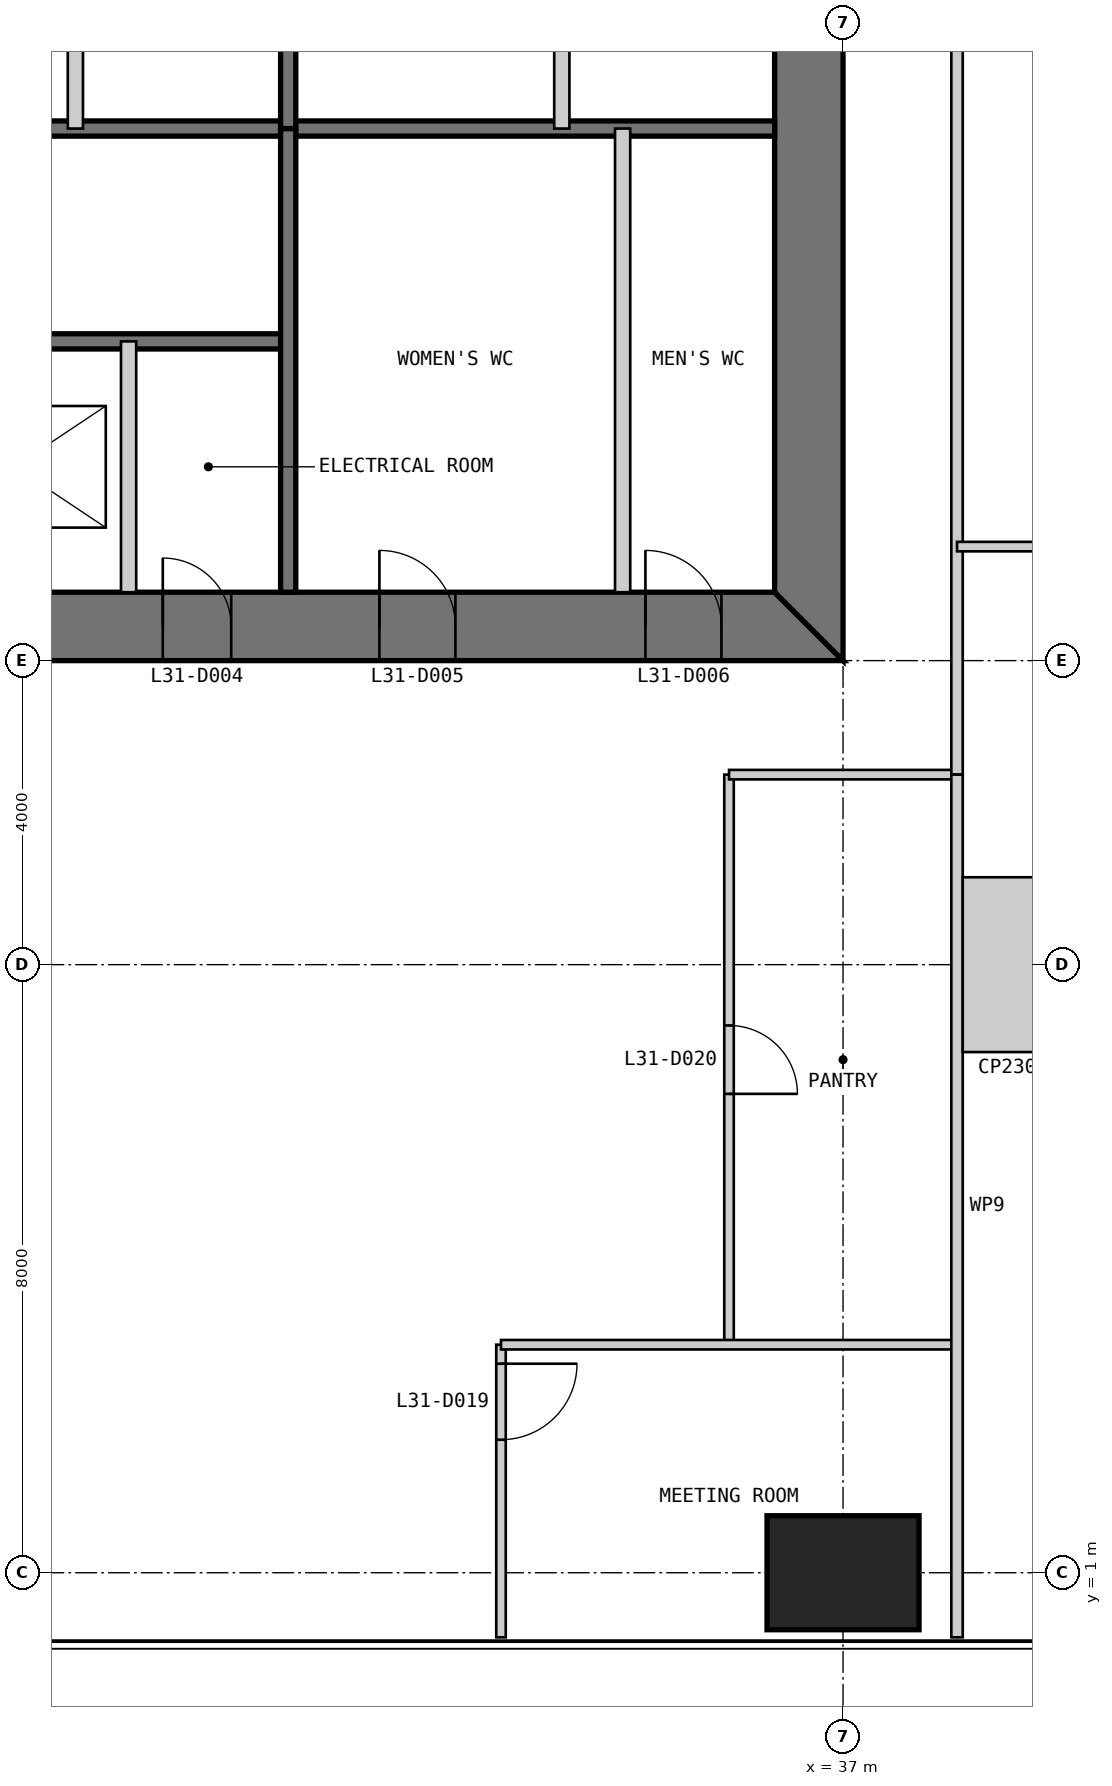
"""IFC4 building model, lengths in metres.
Left out: names, types, materials, properties, quantities, classifications, styles, units other than length and angle.
Written with IfcOpenShell. Run it as: python <this file> out.ifc"""

import sys

from ifc_helpers import new_model, si_unit, direction, frame, frame_2d, origin, origin_2d, place, context, subcontext, project, spatial, polyline, rectangle, outline, extrude, element, fill, save


model = new_model("IFC4")
c1 = context("Model", 3, precision=1e-05, world=origin(), true_north=direction((0.0, 1.0)))
c2 = subcontext(c1, "Body", "Model", "MODEL_VIEW")
j1 = project(units=[si_unit("LENGTHUNIT", "METRE"), si_unit("PLANEANGLEUNIT", "RADIAN")], contexts=[c1])
p1 = place(None, origin())
s1 = spatial("IfcSite", under=j1, at=p1, CompositionType="ELEMENT")
p2 = place(p1, origin())
s2 = spatial("IfcBuilding", under=s1, at=p2, CompositionType="ELEMENT")
p3 = place(p2, frame((0.0, 0.0, 134.4)))
s3 = spatial("IfcBuildingStorey", under=s2, at=p3, CompositionType="ELEMENT", Elevation=134.4)
p4 = place(p3, frame((37.0, 1.0, 0.0), z_axis=(0.0, 0.0, 1.0), x_axis=(1.0, 0.0, 0.0)))
e1 = element("IfcColumn", 1, at=p4, inside=s3, PredefinedType="COLUMN", context=c2, shape_type="SweptSolid", body=[
    extrude(rectangle(XDim=2.0, YDim=1.5, at=origin_2d()), origin(), (0.0, 0.0, 1.0), 4.0),
])
p5 = place(p3, frame((13.0, 13.45, 0.0), z_axis=(0.0, 0.0, 1.0), x_axis=(1.0, 0.0, 0.0)))
e2 = element("IfcWall", 2, at=p5, inside=s3, PredefinedType="SHEAR", context=c2, shape_type="SweptSolid", body=[
    extrude(outline(polyline([(0.0, -0.45), (24.0, -0.45), (23.1, 0.45), (0.9, 0.45), (0.0, -0.45)])), origin(), (0.0, 0.0, 1.0), 4.0),
])
p6 = place(p5, frame((4.9, 0.0, 0.0)))
e3 = element("IfcOpeningElement", 3, at=p6, cuts=e2, PredefinedType="OPENING", context=c2, shape_type="SweptSolid", body=[
    extrude(rectangle(XDim=1.0, YDim=2.2, at=frame_2d((0.5, 1.1))), frame((0.0, 0.46, 0.0), z_axis=(0.0, -1.0, 0.0), x_axis=(1.0, 0.0, 0.0)), (0.0, 0.0, 1.0), 0.92),
])
p7 = place(p5, frame((8.9, 0.0, 0.0)))
e4 = element("IfcOpeningElement", 4, at=p7, cuts=e2, PredefinedType="OPENING", context=c2, shape_type="SweptSolid", body=[
    extrude(rectangle(XDim=1.1, YDim=2.2, at=frame_2d((0.55, 1.1))), frame((0.0, 0.46, 0.0), z_axis=(0.0, -1.0, 0.0), x_axis=(1.0, 0.0, 0.0)), (0.0, 0.0, 1.0), 0.92),
])
p8 = place(p5, frame((15.05, 0.0, 0.0)))
e5 = element("IfcOpeningElement", 5, at=p8, cuts=e2, PredefinedType="OPENING", context=c2, shape_type="SweptSolid", body=[
    extrude(rectangle(XDim=0.9, YDim=2.2, at=frame_2d((0.45, 1.1))), frame((0.0, 0.46, 0.0), z_axis=(0.0, -1.0, 0.0), x_axis=(1.0, 0.0, 0.0)), (0.0, 0.0, 1.0), 0.92),
])
p9 = place(p5, frame((17.9, 0.0, 0.0)))
e6 = element("IfcOpeningElement", 6, at=p9, cuts=e2, PredefinedType="OPENING", context=c2, shape_type="SweptSolid", body=[
    extrude(rectangle(XDim=1.0, YDim=2.2, at=frame_2d((0.5, 1.1))), frame((0.0, 0.46, 0.0), z_axis=(0.0, -1.0, 0.0), x_axis=(1.0, 0.0, 0.0)), (0.0, 0.0, 1.0), 0.92),
])
p10 = place(p5, frame((21.4, 0.0, 0.0)))
e7 = element("IfcOpeningElement", 7, at=p10, cuts=e2, PredefinedType="OPENING", context=c2, shape_type="SweptSolid", body=[
    extrude(rectangle(XDim=1.0, YDim=2.2, at=frame_2d((0.5, 1.1))), frame((0.0, 0.46, 0.0), z_axis=(0.0, -1.0, 0.0), x_axis=(1.0, 0.0, 0.0)), (0.0, 0.0, 1.0), 0.92),
])
p11 = place(p3, frame((36.55, 13.9, 0.0), z_axis=(0.0, 0.0, 1.0), x_axis=(0.0, 1.0, 0.0)))
e8 = element("IfcWall", 8, at=p11, inside=s3, PredefinedType="SHEAR", context=c2, shape_type="SweptSolid", body=[
    extrude(outline(polyline([(-0.9, -0.45), (23.1, -0.45), (22.2, 0.45), (0.0, 0.45), (-0.9, -0.45)])), origin(), (0.0, 0.0, 1.0), 4.0),
])
p12 = place(p11, frame((20.2, 0.0, 0.0)))
e9 = element("IfcOpeningElement", 9, at=p12, cuts=e8, PredefinedType="OPENING", context=c2, shape_type="SweptSolid", body=[
    extrude(rectangle(XDim=1.0, YDim=2.2, at=frame_2d((0.5, 1.1))), frame((0.0, 0.46, 0.0), z_axis=(0.0, -1.0, 0.0), x_axis=(1.0, 0.0, 0.0)), (0.0, 0.0, 1.0), 0.92),
])
p13 = place(p11, frame((17.25, 0.0, 0.0)))
e10 = element("IfcOpeningElement", 10, at=p13, cuts=e8, PredefinedType="OPENING", context=c2, shape_type="SweptSolid", body=[
    extrude(rectangle(XDim=0.9, YDim=2.2, at=frame_2d((0.45, 1.1))), frame((0.0, 0.46, 0.0), z_axis=(0.0, -1.0, 0.0), x_axis=(1.0, 0.0, 0.0)), (0.0, 0.0, 1.0), 0.92),
])
p14 = place(p3, frame((20.3, 17.2, 0.0), z_axis=(0.0, 0.0, 1.0), x_axis=(1.0, 0.0, 0.0)))
e11 = element("IfcWall", 11, at=p14, inside=s3, PredefinedType="SOLIDWALL", context=c2, shape_type="SweptSolid", body=[
    extrude(rectangle(XDim=9.4, YDim=0.2, at=frame_2d((4.7, 0.0))), origin(), (0.0, 0.0, 1.0), 3.8),
])
p15 = place(p14, frame((0.25, 0.0, 0.0)))
e12 = element("IfcOpeningElement", 12, at=p15, cuts=e11, PredefinedType="OPENING", context=c2, shape_type="SweptSolid", body=[
    extrude(rectangle(XDim=1.0, YDim=2.2, at=frame_2d((0.5, 1.1))), frame((0.0, 0.11, 0.0), z_axis=(0.0, -1.0, 0.0), x_axis=(1.0, 0.0, 0.0)), (0.0, 0.0, 1.0), 0.22),
])
p16 = place(p3, frame((20.3, 20.0, 0.0), z_axis=(0.0, 0.0, 1.0), x_axis=(1.0, 0.0, 0.0)))
e13 = element("IfcWall", 13, at=p16, inside=s3, PredefinedType="SOLIDWALL", context=c2, shape_type="SweptSolid", body=[
    extrude(rectangle(XDim=15.8, YDim=0.2, at=frame_2d((7.9, 0.0))), origin(), (0.0, 0.0, 1.0), 3.8),
])
p17 = place(p3, frame((27.6, 13.9, 0.0), z_axis=(0.0, 0.0, 1.0), x_axis=(0.0, 1.0, 0.0)))
e14 = element("IfcWall", 14, at=p17, inside=s3, PredefinedType="PARTITIONING", context=c2, shape_type="SweptSolid", body=[
    extrude(rectangle(XDim=3.3, YDim=0.2, at=frame_2d((1.65, 0.0))), origin(), (0.0, 0.0, 1.0), 3.8),
])
p18 = place(p3, frame((29.7, 13.9, 0.0), z_axis=(0.0, 0.0, 1.0), x_axis=(0.0, 1.0, 0.0)))
e15 = element("IfcWall", 15, at=p18, inside=s3, PredefinedType="SOLIDWALL", context=c2, shape_type="SweptSolid", body=[
    extrude(rectangle(XDim=6.1, YDim=0.2, at=frame_2d((3.05, 0.0))), origin(), (0.0, 0.0, 1.0), 3.8),
])
p19 = place(p3, frame((34.1, 13.9, 0.0), z_axis=(0.0, 0.0, 1.0), x_axis=(0.0, 1.0, 0.0)))
e16 = element("IfcWall", 16, at=p19, inside=s3, PredefinedType="PARTITIONING", context=c2, shape_type="SweptSolid", body=[
    extrude(rectangle(XDim=6.1, YDim=0.2, at=frame_2d((3.05, 0.0))), origin(), (0.0, 0.0, 1.0), 3.8),
])
p20 = place(p3, frame((33.3, 36.1, 0.0), z_axis=(0.0, 0.0, 1.0), x_axis=(0.0, -1.0, 0.0)))
e17 = element("IfcWall", 17, at=p20, inside=s3, PredefinedType="PARTITIONING", context=c2, shape_type="SweptSolid", body=[
    extrude(rectangle(XDim=16.1, YDim=0.2, at=frame_2d((8.05, 0.0))), origin(), (0.0, 0.0, 1.0), 3.8),
])
p21 = place(p3, frame((29.7, 36.1, 0.0), z_axis=(0.0, 0.0, 1.0), x_axis=(0.0, -1.0, 0.0)))
e18 = element("IfcWall", 18, at=p21, inside=s3, PredefinedType="SOLIDWALL", context=c2, shape_type="SweptSolid", body=[
    extrude(rectangle(XDim=16.1, YDim=0.2, at=frame_2d((8.05, 0.0))), origin(), (0.0, 0.0, 1.0), 3.8),
])
p22 = place(p3, frame((26.9, 30.0, 0.0), z_axis=(0.0, 0.0, 1.0), x_axis=(0.0, -1.0, 0.0)))
e19 = element("IfcWall", 19, at=p22, inside=s3, PredefinedType="PARTITIONING", context=c2, shape_type="SweptSolid", body=[
    extrude(rectangle(XDim=10.0, YDim=0.2, at=frame_2d((5.0, 0.0))), origin(), (0.0, 0.0, 1.0), 3.8),
])
p23 = place(p3, frame((32.5, 0.15, 0.0), z_axis=(0.0, 0.0, 1.0), x_axis=(0.0, 1.0, 0.0)))
e20 = element("IfcWall", 20, at=p23, inside=s3, PredefinedType="PARTITIONING", context=c2, shape_type="SweptSolid", body=[
    extrude(rectangle(XDim=3.85, YDim=0.125, at=frame_2d((1.925, 0.0))), origin(), (0.0, 0.0, 1.0), 3.85),
])
p24 = place(p23, frame((2.6, 0.0, 0.0)))
e21 = element("IfcOpeningElement", 21, at=p24, cuts=e20, PredefinedType="OPENING", context=c2, shape_type="SweptSolid", body=[
    extrude(rectangle(XDim=1.0, YDim=2.2, at=frame_2d((0.5, 1.1))), frame((0.0, 0.073, 0.0), z_axis=(0.0, -1.0, 0.0), x_axis=(1.0, 0.0, 0.0)), (0.0, 0.0, 1.0), 0.145),
])
p25 = place(p3, frame((35.5, 4.0, 0.0), z_axis=(0.0, 0.0, 1.0), x_axis=(0.0, 1.0, 0.0)))
e22 = element("IfcWall", 22, at=p25, inside=s3, PredefinedType="PARTITIONING", context=c2, shape_type="SweptSolid", body=[
    extrude(rectangle(XDim=7.5, YDim=0.125, at=frame_2d((3.75, 0.0))), origin(), (0.0, 0.0, 1.0), 3.85),
])
p26 = place(p25, frame((3.3, 0.0, 0.0)))
e23 = element("IfcOpeningElement", 23, at=p26, cuts=e22, PredefinedType="OPENING", context=c2, shape_type="SweptSolid", body=[
    extrude(rectangle(XDim=0.9, YDim=2.2, at=frame_2d((0.45, 1.1))), frame((0.0, 0.073, 0.0), z_axis=(0.0, -1.0, 0.0), x_axis=(1.0, 0.0, 0.0)), (0.0, 0.0, 1.0), 0.145),
])
p27 = place(p3, frame((32.5, 4.0, 0.0), z_axis=(0.0, 0.0, 1.0), x_axis=(1.0, 0.0, 0.0)))
e24 = element("IfcWall", 24, at=p27, inside=s3, PredefinedType="PARTITIONING", context=c2, shape_type="SweptSolid", body=[
    extrude(rectangle(XDim=6.0, YDim=0.125, at=frame_2d((3.0, 0.0))), origin(), (0.0, 0.0, 1.0), 3.85),
])
p28 = place(p3, frame((35.5, 11.5, 0.0), z_axis=(0.0, 0.0, 1.0), x_axis=(1.0, 0.0, 0.0)))
e25 = element("IfcWall", 25, at=p28, inside=s3, PredefinedType="PARTITIONING", context=c2, shape_type="SweptSolid", body=[
    extrude(rectangle(XDim=3.0, YDim=0.125, at=frame_2d((1.5, 0.0))), origin(), (0.0, 0.0, 1.0), 3.85),
])
p29 = place(p3, frame((38.5, 11.5, 0.0), z_axis=(0.0, 0.0, 1.0), x_axis=(0.0, 1.0, 0.0)))
e26 = element("IfcWall", 26, at=p29, inside=s3, PredefinedType="PARTITIONING", context=c2, shape_type="SweptSolid", body=[
    extrude(rectangle(XDim=27.0, YDim=0.15, at=frame_2d((13.5, 0.0))), origin(), (0.0, 0.0, 1.0), 3.85),
])
p30 = place(p29, frame((13.0, 0.0, 0.0)))
e27 = element("IfcOpeningElement", 27, at=p30, cuts=e26, PredefinedType="OPENING", context=c2, shape_type="SweptSolid", body=[
    extrude(rectangle(XDim=1.0, YDim=2.2, at=frame_2d((0.5, 1.1))), frame((0.0, 0.085, 0.0), z_axis=(0.0, -1.0, 0.0), x_axis=(1.0, 0.0, 0.0)), (0.0, 0.0, 1.0), 0.17),
])
p31 = place(p3, frame((38.5, 0.15, 0.0), z_axis=(0.0, 0.0, 1.0), x_axis=(0.0, 1.0, 0.0)))
e28 = element("IfcWall", 28, at=p31, inside=s3, PredefinedType="PARTITIONING", context=c2, shape_type="SweptSolid", body=[
    extrude(rectangle(XDim=11.35, YDim=0.15, at=frame_2d((5.675, 0.0))), origin(), (0.0, 0.0, 1.0), 3.85),
])
p32 = place(p3, frame((49.85, 14.5, 0.0), z_axis=(0.0, 0.0, 1.0), x_axis=(-1.0, 0.0, 0.0)))
e29 = element("IfcWall", 29, at=p32, inside=s3, PredefinedType="PARTITIONING", context=c2, shape_type="SweptSolid", body=[
    extrude(rectangle(XDim=11.35, YDim=0.125, at=frame_2d((5.675, 0.0))), origin(), (0.0, 0.0, 1.0), 3.85),
])
p33 = place(p32, frame((7.15, 0.0, 0.0)))
e30 = element("IfcOpeningElement", 30, at=p33, cuts=e29, PredefinedType="OPENING", context=c2, shape_type="SweptSolid", body=[
    extrude(rectangle(XDim=0.9, YDim=2.2, at=frame_2d((0.45, 1.1))), frame((0.0, 0.073, 0.0), z_axis=(0.0, -1.0, 0.0), x_axis=(1.0, 0.0, 0.0)), (0.0, 0.0, 1.0), 0.145),
])
p34 = place(p3, frame((38.575, 9.0, 0.0), z_axis=(0.0, 0.0, 1.0), x_axis=(1.0, 0.0, 0.0)))
e31 = element("IfcWall", 31, at=p34, inside=s3, PredefinedType="PARTITIONING", context=c2, shape_type="SweptSolid", body=[
    extrude(rectangle(XDim=1.325, YDim=2.3, at=frame_2d((0.663, 0.0))), origin(), (0.0, 0.0, 1.0), 3.85),
])
p35 = place(p8, origin())
e32 = element("IfcDoor", 32, at=p35, inside=s3, OperationType="SINGLE_SWING_LEFT", PredefinedType="DOOR", context=c2, shape_type="SweptSolid", body=[
    extrude(rectangle(XDim=0.9, YDim=2.2, at=frame_2d((0.45, 1.1))), frame((0.0, 0.025, 0.0), z_axis=(0.0, -1.0, 0.0), x_axis=(1.0, 0.0, 0.0)), (0.0, 0.0, 1.0), 0.05),
    extrude(outline(polyline([(0.0, 0.0), (0.04, 0.0), (0.04, 2.16), (0.86, 2.16), (0.86, 0.0), (0.9, 0.0), (0.9, 2.2), (0.0, 2.2), (0.0, 0.0)])), frame((0.0, 0.3, 0.0), z_axis=(0.0, -1.0, 0.0), x_axis=(1.0, 0.0, 0.0)), (0.0, 0.0, 1.0), 0.6),
])
fill(e5, e32)
p36 = place(p9, origin())
e33 = element("IfcDoor", 33, at=p36, inside=s3, OperationType="SINGLE_SWING_LEFT", PredefinedType="DOOR", context=c2, shape_type="SweptSolid", body=[
    extrude(rectangle(XDim=1.0, YDim=2.2, at=frame_2d((0.5, 1.1))), frame((0.0, 0.025, 0.0), z_axis=(0.0, -1.0, 0.0), x_axis=(1.0, 0.0, 0.0)), (0.0, 0.0, 1.0), 0.05),
    extrude(outline(polyline([(0.0, 0.0), (0.04, 0.0), (0.04, 2.16), (0.96, 2.16), (0.96, 0.0), (1.0, 0.0), (1.0, 2.2), (0.0, 2.2), (0.0, 0.0)])), frame((0.0, 0.3, 0.0), z_axis=(0.0, -1.0, 0.0), x_axis=(1.0, 0.0, 0.0)), (0.0, 0.0, 1.0), 0.6),
])
fill(e6, e33)
p37 = place(p10, origin())
e34 = element("IfcDoor", 34, at=p37, inside=s3, OperationType="SINGLE_SWING_LEFT", PredefinedType="DOOR", context=c2, shape_type="SweptSolid", body=[
    extrude(rectangle(XDim=1.0, YDim=2.2, at=frame_2d((0.5, 1.1))), frame((0.0, 0.025, 0.0), z_axis=(0.0, -1.0, 0.0), x_axis=(1.0, 0.0, 0.0)), (0.0, 0.0, 1.0), 0.05),
    extrude(outline(polyline([(0.0, 0.0), (0.04, 0.0), (0.04, 2.16), (0.96, 2.16), (0.96, 0.0), (1.0, 0.0), (1.0, 2.2), (0.0, 2.2), (0.0, 0.0)])), frame((0.0, 0.3, 0.0), z_axis=(0.0, -1.0, 0.0), x_axis=(1.0, 0.0, 0.0)), (0.0, 0.0, 1.0), 0.6),
])
fill(e7, e34)
p38 = place(p24, frame((1.0, 0.0, 0.0), z_axis=(0.0, 0.0, 1.0), x_axis=(-1.0, 0.0, 0.0)))
e35 = element("IfcDoor", 35, at=p38, inside=s3, OperationType="SINGLE_SWING_LEFT", PredefinedType="DOOR", context=c2, shape_type="SweptSolid", body=[
    extrude(rectangle(XDim=1.0, YDim=2.2, at=frame_2d((0.5, 1.1))), frame((0.0, 0.025, 0.0), z_axis=(0.0, -1.0, 0.0), x_axis=(1.0, 0.0, 0.0)), (0.0, 0.0, 1.0), 0.05),
])
fill(e21, e35)
p39 = place(p26, frame((0.9, 0.0, 0.0), z_axis=(0.0, 0.0, 1.0), x_axis=(-1.0, 0.0, 0.0)))
e36 = element("IfcDoor", 36, at=p39, inside=s3, OperationType="SINGLE_SWING_RIGHT", PredefinedType="DOOR", context=c2, shape_type="SweptSolid", body=[
    extrude(rectangle(XDim=0.9, YDim=2.2, at=frame_2d((0.45, 1.1))), frame((0.0, 0.025, 0.0), z_axis=(0.0, -1.0, 0.0), x_axis=(1.0, 0.0, 0.0)), (0.0, 0.0, 1.0), 0.05),
])
fill(e23, e36)
save(model, sys.argv[1])
